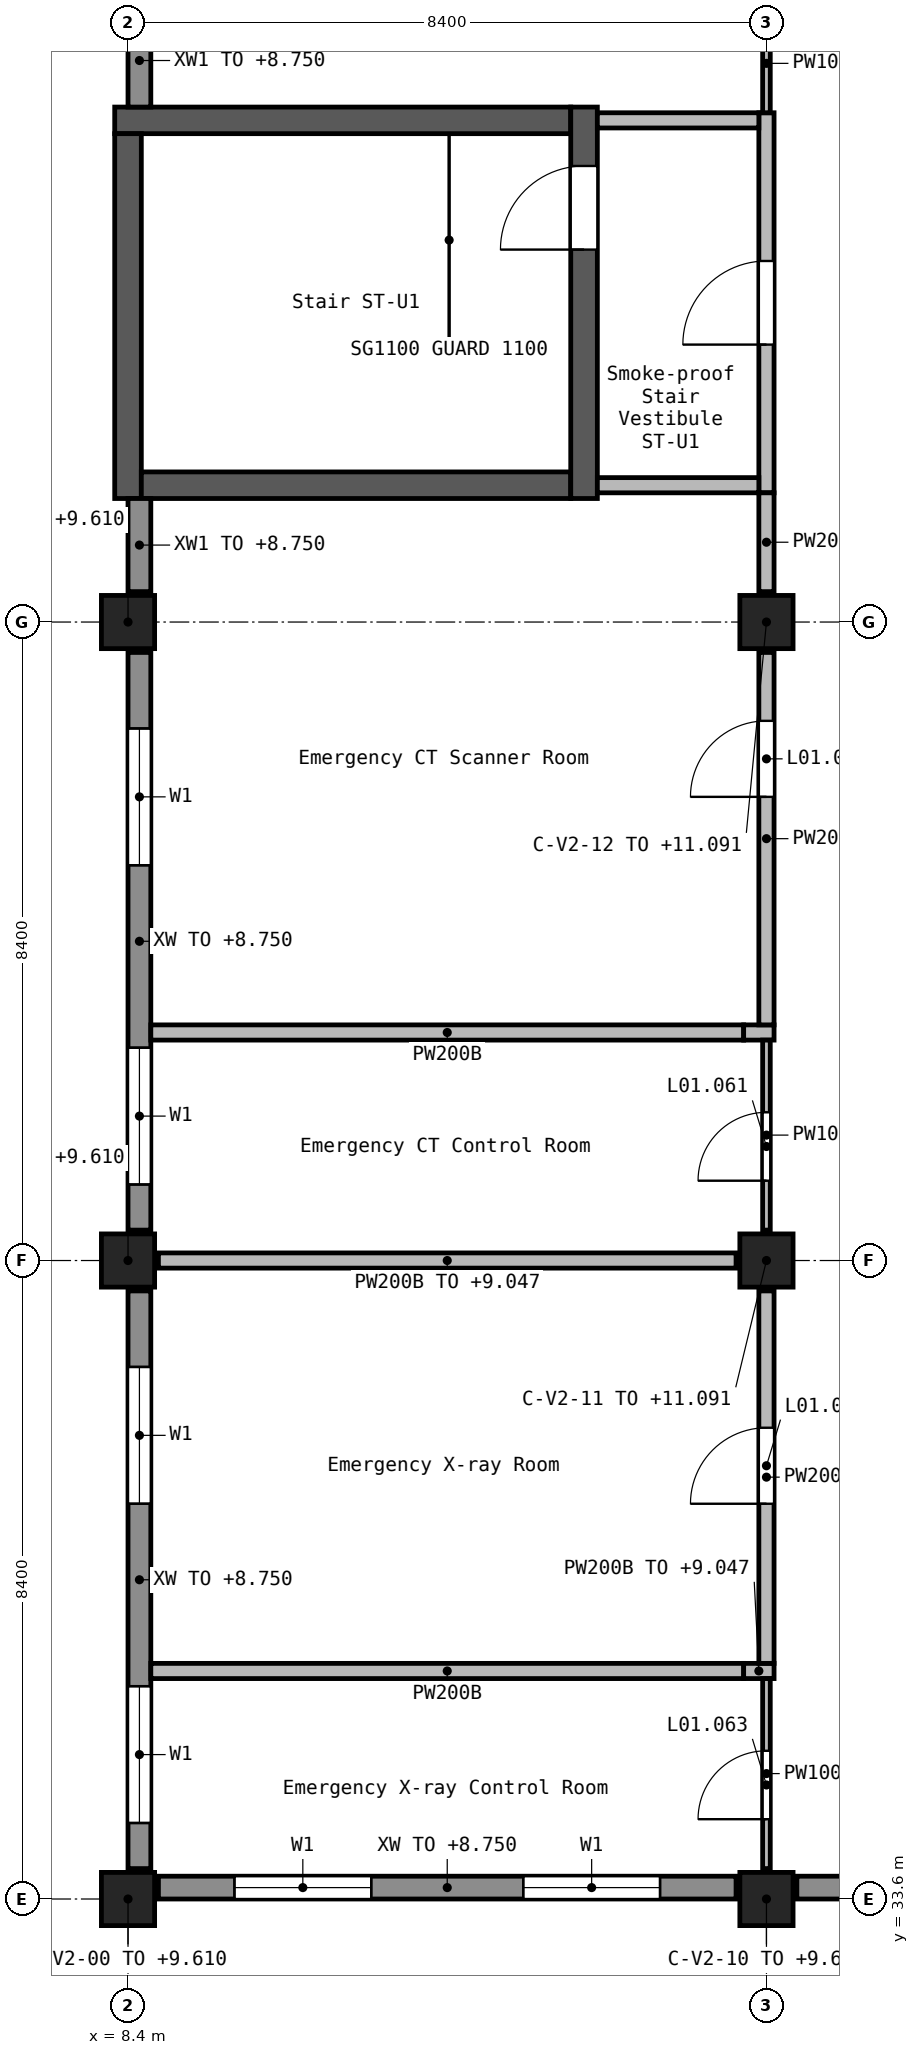
"""IFC4 building model, lengths in metres.
Left out: names, types, materials, properties, quantities, classifications, styles, units other than length and angle.
Written with IfcOpenShell. Run it as: python <this file> out.ifc"""

import sys

from ifc_helpers import new_model, si_unit, direction, frame, frame_2d, origin, origin_2d, place, context, subcontext, project, spatial, rectangle, extrude, element, fill, save


model = new_model("IFC4")
c1 = context("Model", 3, precision=1e-05, world=origin(), true_north=direction((0.0, 1.0)))
c2 = subcontext(c1, "Body", "Model", "MODEL_VIEW")
j1 = project(units=[si_unit("LENGTHUNIT", "METRE"), si_unit("PLANEANGLEUNIT", "RADIAN")], contexts=[c1])
p1 = place(None, origin())
s1 = spatial("IfcSite", under=j1, at=p1, CompositionType="ELEMENT")
p2 = place(p1, origin())
s2 = spatial("IfcBuilding", under=s1, at=p2, CompositionType="ELEMENT")
p3 = place(p2, frame((0.0, 0.0, 5.4)))
s3 = spatial("IfcBuildingStorey", under=s2, at=p3, CompositionType="ELEMENT", Elevation=5.4)
for number, where, z_axis, x_axis in (
    (1, (8.4, 33.6, 0.0), (0.0, 0.0, 1.0), (1.0, 0.0, 0.0)),
    (2, (8.4, 42.0, 0.0), (0.0, 0.0, 1.0), (1.0, 0.0, 0.0)),
    (3, (8.4, 50.4, 0.0), (0.0, 0.0, 1.0), (1.0, 0.0, 0.0)),
    (4, (16.8, 33.6, 0.0), (0.0, 0.0, 1.0), (1.0, 0.0, 0.0)),
):
    element("IfcColumn", number, at=place(p3, frame(where, z_axis=z_axis, x_axis=x_axis)), inside=s3, PredefinedType="COLUMN", context=c2, shape_type="SweptSolid", body=[
        extrude(rectangle(XDim=0.7, YDim=0.7, at=origin_2d()), origin(), (0.0, 0.0, 1.0), 4.21),
    ])
for number, where, z_axis, x_axis in (
    (5, (16.8, 42.0, 0.0), (0.0, 0.0, 1.0), (1.0, 0.0, 0.0)),
    (6, (16.8, 50.4, 0.0), (0.0, 0.0, 1.0), (1.0, 0.0, 0.0)),
):
    element("IfcColumn", number, at=place(p3, frame(where, z_axis=z_axis, x_axis=x_axis)), inside=s3, PredefinedType="COLUMN", context=c2, shape_type="SweptSolid", body=[
        extrude(rectangle(XDim=0.7, YDim=0.7, at=origin_2d()), origin(), (0.0, 0.0, 1.0), 5.691),
    ])
p4 = place(p3, frame((8.225, 57.0, 0.0), z_axis=(0.0, 0.0, 1.0), x_axis=(1.0, 0.0, 0.0)))
e7 = element("IfcWall", 7, at=p4, inside=s3, PredefinedType="SHEAR", context=c2, shape_type="SweptSolid", body=[
    extrude(rectangle(XDim=6.0, YDim=0.35, at=frame_2d((3.0, 0.0))), origin(), (0.0, 0.0, 1.0), 4.5),
])
p5 = place(p3, frame((8.4, 52.025, 0.0), z_axis=(0.0, 0.0, 1.0), x_axis=(0.0, 1.0, 0.0)))
e8 = element("IfcWall", 8, at=p5, inside=s3, PredefinedType="SHEAR", context=c2, shape_type="SweptSolid", body=[
    extrude(rectangle(XDim=4.8, YDim=0.35, at=frame_2d((2.4, 0.0))), origin(), (0.0, 0.0, 1.0), 4.5),
])
p6 = place(p3, frame((8.575, 52.2, 0.0), z_axis=(0.0, 0.0, 1.0), x_axis=(1.0, 0.0, 0.0)))
e9 = element("IfcWall", 9, at=p6, inside=s3, PredefinedType="SHEAR", context=c2, shape_type="SweptSolid", body=[
    extrude(rectangle(XDim=5.65, YDim=0.35, at=frame_2d((2.825, 0.0))), origin(), (0.0, 0.0, 1.0), 4.5),
])
p7 = place(p3, frame((14.4, 52.025, 0.0), z_axis=(0.0, 0.0, 1.0), x_axis=(0.0, 1.0, 0.0)))
e10 = element("IfcWall", 10, at=p7, inside=s3, PredefinedType="SHEAR", context=c2, shape_type="SweptSolid", body=[
    extrude(rectangle(XDim=5.15, YDim=0.35, at=frame_2d((2.575, 0.0))), origin(), (0.0, 0.0, 1.0), 4.5),
])
p8 = place(p7, frame((3.275, 0.0, 0.0)))
e11 = element("IfcOpeningElement", 11, at=p8, cuts=e10, PredefinedType="OPENING", context=c2, shape_type="SweptSolid", body=[
    extrude(rectangle(XDim=1.1, YDim=2.1, at=frame_2d((0.55, 1.05))), frame((0.0, 0.185, 0.0), z_axis=(0.0, -1.0, 0.0), x_axis=(1.0, 0.0, 0.0)), (0.0, 0.0, 1.0), 0.37),
])
for number, where, z_axis, x_axis in (
    (12, (8.55, 58.4, 0.0), (0.0, 0.0, 1.0), (0.0, -1.0, 0.0)),
    (13, (8.55, 52.025, 0.0), (0.0, 0.0, 1.0), (0.0, -1.0, 0.0)),
):
    element("IfcWall", number, at=place(p3, frame(where, z_axis=z_axis, x_axis=x_axis)), inside=s3, PredefinedType="STANDARD", context=c2, shape_type="SweptSolid", body=[
        extrude(rectangle(XDim=1.225, YDim=0.3, at=frame_2d((0.612, 0.0))), origin(), (0.0, 0.0, 1.0), 3.35),
    ])
p9 = place(p3, frame((8.55, 50.0, 0.0), z_axis=(0.0, 0.0, 1.0), x_axis=(0.0, -1.0, 0.0)))
e14 = element("IfcWall", 14, at=p9, inside=s3, PredefinedType="STANDARD", context=c2, shape_type="SweptSolid", body=[
    extrude(rectangle(XDim=7.6, YDim=0.3, at=frame_2d((3.8, 0.0))), origin(), (0.0, 0.0, 1.0), 3.35),
])
p10 = place(p9, frame((1.0, 0.0, 0.9)))
e15 = element("IfcOpeningElement", 15, at=p10, cuts=e14, PredefinedType="OPENING", context=c2, shape_type="SweptSolid", body=[
    extrude(rectangle(XDim=1.8, YDim=1.5, at=frame_2d((0.9, 0.75))), frame((0.0, 0.16, 0.0), z_axis=(0.0, -1.0, 0.0), x_axis=(1.0, 0.0, 0.0)), (0.0, 0.0, 1.0), 0.32),
])
p11 = place(p9, frame((5.2, 0.0, 0.9)))
e16 = element("IfcOpeningElement", 16, at=p11, cuts=e14, PredefinedType="OPENING", context=c2, shape_type="SweptSolid", body=[
    extrude(rectangle(XDim=1.8, YDim=1.5, at=frame_2d((0.9, 0.75))), frame((0.0, 0.16, 0.0), z_axis=(0.0, -1.0, 0.0), x_axis=(1.0, 0.0, 0.0)), (0.0, 0.0, 1.0), 0.32),
])
p12 = place(p3, frame((8.55, 41.6, 0.0), z_axis=(0.0, 0.0, 1.0), x_axis=(0.0, -1.0, 0.0)))
e17 = element("IfcWall", 17, at=p12, inside=s3, PredefinedType="STANDARD", context=c2, shape_type="SweptSolid", body=[
    extrude(rectangle(XDim=7.6, YDim=0.3, at=frame_2d((3.8, 0.0))), origin(), (0.0, 0.0, 1.0), 3.35),
])
p13 = place(p12, frame((1.0, 0.0, 0.9)))
e18 = element("IfcOpeningElement", 18, at=p13, cuts=e17, PredefinedType="OPENING", context=c2, shape_type="SweptSolid", body=[
    extrude(rectangle(XDim=1.8, YDim=1.5, at=frame_2d((0.9, 0.75))), frame((0.0, 0.16, 0.0), z_axis=(0.0, -1.0, 0.0), x_axis=(1.0, 0.0, 0.0)), (0.0, 0.0, 1.0), 0.32),
])
p14 = place(p12, frame((5.2, 0.0, 0.9)))
e19 = element("IfcOpeningElement", 19, at=p14, cuts=e17, PredefinedType="OPENING", context=c2, shape_type="SweptSolid", body=[
    extrude(rectangle(XDim=1.8, YDim=1.5, at=frame_2d((0.9, 0.75))), frame((0.0, 0.16, 0.0), z_axis=(0.0, -1.0, 0.0), x_axis=(1.0, 0.0, 0.0)), (0.0, 0.0, 1.0), 0.32),
])
p15 = place(p3, frame((8.8, 33.75, 0.0), z_axis=(0.0, 0.0, 1.0), x_axis=(1.0, 0.0, 0.0)))
e20 = element("IfcWall", 20, at=p15, inside=s3, PredefinedType="STANDARD", context=c2, shape_type="SweptSolid", body=[
    extrude(rectangle(XDim=7.6, YDim=0.3, at=frame_2d((3.8, 0.0))), origin(), (0.0, 0.0, 1.0), 3.35),
])
p16 = place(p15, frame((1.0, 0.0, 0.9)))
e21 = element("IfcOpeningElement", 21, at=p16, cuts=e20, PredefinedType="OPENING", context=c2, shape_type="SweptSolid", body=[
    extrude(rectangle(XDim=1.8, YDim=1.5, at=frame_2d((0.9, 0.75))), frame((0.0, 0.16, 0.0), z_axis=(0.0, -1.0, 0.0), x_axis=(1.0, 0.0, 0.0)), (0.0, 0.0, 1.0), 0.32),
])
p17 = place(p15, frame((4.8, 0.0, 0.9)))
e22 = element("IfcOpeningElement", 22, at=p17, cuts=e20, PredefinedType="OPENING", context=c2, shape_type="SweptSolid", body=[
    extrude(rectangle(XDim=1.8, YDim=1.5, at=frame_2d((0.9, 0.75))), frame((0.0, 0.16, 0.0), z_axis=(0.0, -1.0, 0.0), x_axis=(1.0, 0.0, 0.0)), (0.0, 0.0, 1.0), 0.32),
])
p18 = place(p3, frame((17.2, 33.75, 0.0), z_axis=(0.0, 0.0, 1.0), x_axis=(1.0, 0.0, 0.0)))
e23 = element("IfcWall", 23, at=p18, inside=s3, PredefinedType="STANDARD", context=c2, shape_type="SweptSolid", body=[
    extrude(rectangle(XDim=7.6, YDim=0.3, at=frame_2d((3.8, 0.0))), origin(), (0.0, 0.0, 1.0), 3.35),
])
p19 = place(p18, frame((0.65, 0.0, 0.9)))
e24 = element("IfcOpeningElement", 24, at=p19, cuts=e23, PredefinedType="OPENING", context=c2, shape_type="SweptSolid", body=[
    extrude(rectangle(XDim=1.8, YDim=1.5, at=frame_2d((0.9, 0.75))), frame((0.0, 0.16, 0.0), z_axis=(0.0, -1.0, 0.0), x_axis=(1.0, 0.0, 0.0)), (0.0, 0.0, 1.0), 0.32),
])
p20 = place(p18, frame((4.8, 0.0, 0.9)))
e25 = element("IfcOpeningElement", 25, at=p20, cuts=e23, PredefinedType="OPENING", context=c2, shape_type="SweptSolid", body=[
    extrude(rectangle(XDim=1.8, YDim=1.5, at=frame_2d((0.9, 0.75))), frame((0.0, 0.16, 0.0), z_axis=(0.0, -1.0, 0.0), x_axis=(1.0, 0.0, 0.0)), (0.0, 0.0, 1.0), 0.32),
])
p21 = place(p3, frame((16.8, 52.1, 0.0), z_axis=(0.0, 0.0, 1.0), x_axis=(0.0, 1.0, 0.0)))
e26 = element("IfcWall", 26, at=p21, inside=s3, PredefinedType="SOLIDWALL", context=c2, shape_type="SweptSolid", body=[
    extrude(rectangle(XDim=5.0, YDim=0.2, at=frame_2d((2.5, 0.0))), origin(), (0.0, 0.0, 1.0), 4.15),
])
p22 = place(p21, frame((1.95, 0.0, 0.0)))
e27 = element("IfcOpeningElement", 27, at=p22, cuts=e26, PredefinedType="OPENING", context=c2, shape_type="SweptSolid", body=[
    extrude(rectangle(XDim=1.1, YDim=2.1, at=frame_2d((0.55, 1.05))), frame((0.0, 0.11, 0.0), z_axis=(0.0, -1.0, 0.0), x_axis=(1.0, 0.0, 0.0)), (0.0, 0.0, 1.0), 0.22),
])
for number, where, z_axis, x_axis in (
    (28, (14.575, 52.2, 0.0), (0.0, 0.0, 1.0), (1.0, 0.0, 0.0)),
    (29, (14.575, 57.0, 0.0), (0.0, 0.0, 1.0), (1.0, 0.0, 0.0)),
):
    element("IfcWall", number, at=place(p3, frame(where, z_axis=z_axis, x_axis=x_axis)), inside=s3, PredefinedType="SOLIDWALL", context=c2, shape_type="SweptSolid", body=[
        extrude(rectangle(XDim=2.125, YDim=0.2, at=frame_2d((1.062, 0.0))), origin(), (0.0, 0.0, 1.0), 4.15),
    ])
p23 = place(p3, frame((8.7, 36.6, 0.0), z_axis=(0.0, 0.0, 1.0), x_axis=(1.0, 0.0, 0.0)))
e30 = element("IfcWall", 30, at=p23, inside=s3, PredefinedType="SOLIDWALL", context=c2, shape_type="SweptSolid", body=[
    extrude(rectangle(XDim=7.8, YDim=0.2, at=frame_2d((3.9, 0.0))), origin(), (0.0, 0.0, 1.0), 4.15),
])
p24 = place(p3, frame((16.5, 36.6, 0.0), z_axis=(0.0, 0.0, 1.0), x_axis=(1.0, 0.0, 0.0)))
e31 = element("IfcWall", 31, at=p24, inside=s3, PredefinedType="SOLIDWALL", context=c2, shape_type="SweptSolid", body=[
    extrude(rectangle(XDim=0.4, YDim=0.2, at=frame_2d((0.2, 0.0))), origin(), (0.0, 0.0, 1.0), 3.647),
])
p25 = place(p3, frame((8.8, 42.0, 0.0), z_axis=(0.0, 0.0, 1.0), x_axis=(1.0, 0.0, 0.0)))
e32 = element("IfcWall", 32, at=p25, inside=s3, PredefinedType="SOLIDWALL", context=c2, shape_type="SweptSolid", body=[
    extrude(rectangle(XDim=7.6, YDim=0.2, at=frame_2d((3.8, 0.0))), origin(), (0.0, 0.0, 1.0), 3.647),
])
p26 = place(p3, frame((8.7, 45.0, 0.0), z_axis=(0.0, 0.0, 1.0), x_axis=(1.0, 0.0, 0.0)))
e33 = element("IfcWall", 33, at=p26, inside=s3, PredefinedType="SOLIDWALL", context=c2, shape_type="SweptSolid", body=[
    extrude(rectangle(XDim=7.8, YDim=0.2, at=frame_2d((3.9, 0.0))), origin(), (0.0, 0.0, 1.0), 4.15),
])
p27 = place(p3, frame((16.5, 45.0, 0.0), z_axis=(0.0, 0.0, 1.0), x_axis=(1.0, 0.0, 0.0)))
e34 = element("IfcWall", 34, at=p27, inside=s3, PredefinedType="SOLIDWALL", context=c2, shape_type="SweptSolid", body=[
    extrude(rectangle(XDim=0.4, YDim=0.2, at=frame_2d((0.2, 0.0))), origin(), (0.0, 0.0, 1.0), 4.15),
])
p28 = place(p3, frame((16.8, 45.1, 0.0), z_axis=(0.0, 0.0, 1.0), x_axis=(0.0, 1.0, 0.0)))
e35 = element("IfcWall", 35, at=p28, inside=s3, PredefinedType="SOLIDWALL", context=c2, shape_type="SweptSolid", body=[
    extrude(rectangle(XDim=4.9, YDim=0.2, at=frame_2d((2.45, 0.0))), origin(), (0.0, 0.0, 1.0), 4.15),
])
p29 = place(p28, frame((3.0, 0.0, 0.0)))
e36 = element("IfcOpeningElement", 36, at=p29, cuts=e35, PredefinedType="OPENING", context=c2, shape_type="SweptSolid", body=[
    extrude(rectangle(XDim=1.0, YDim=2.1, at=frame_2d((0.5, 1.05))), frame((0.0, 0.11, 0.0), z_axis=(0.0, -1.0, 0.0), x_axis=(1.0, 0.0, 0.0)), (0.0, 0.0, 1.0), 0.22),
])
p30 = place(p3, frame((16.8, 50.8, 0.0), z_axis=(0.0, 0.0, 1.0), x_axis=(0.0, 1.0, 0.0)))
e37 = element("IfcWall", 37, at=p30, inside=s3, PredefinedType="SOLIDWALL", context=c2, shape_type="SweptSolid", body=[
    extrude(rectangle(XDim=1.3, YDim=0.2, at=frame_2d((0.65, 0.0))), origin(), (0.0, 0.0, 1.0), 4.15),
])
p31 = place(p3, frame((16.8, 36.7, 0.0), z_axis=(0.0, 0.0, 1.0), x_axis=(0.0, 1.0, 0.0)))
e38 = element("IfcWall", 38, at=p31, inside=s3, PredefinedType="SOLIDWALL", context=c2, shape_type="SweptSolid", body=[
    extrude(rectangle(XDim=4.9, YDim=0.2, at=frame_2d((2.45, 0.0))), origin(), (0.0, 0.0, 1.0), 3.647),
])
p32 = place(p31, frame((2.1, 0.0, 0.0)))
e39 = element("IfcOpeningElement", 39, at=p32, cuts=e38, PredefinedType="OPENING", context=c2, shape_type="SweptSolid", body=[
    extrude(rectangle(XDim=1.0, YDim=2.1, at=frame_2d((0.5, 1.05))), frame((0.0, 0.11, 0.0), z_axis=(0.0, -1.0, 0.0), x_axis=(1.0, 0.0, 0.0)), (0.0, 0.0, 1.0), 0.22),
])
p33 = place(p3, frame((16.8, 58.4, 0.0), z_axis=(0.0, 0.0, 1.0), x_axis=(0.0, -1.0, 0.0)))
e40 = element("IfcWall", 40, at=p33, inside=s3, PredefinedType="PARTITIONING", context=c2, shape_type="SweptSolid", body=[
    extrude(rectangle(XDim=1.3, YDim=0.1, at=frame_2d((0.65, 0.0))), origin(), (0.0, 0.0, 1.0), 4.15),
])
p34 = place(p3, frame((16.8, 34.0, 0.0), z_axis=(0.0, 0.0, 1.0), x_axis=(0.0, 1.0, 0.0)))
e41 = element("IfcWall", 41, at=p34, inside=s3, PredefinedType="PARTITIONING", context=c2, shape_type="SweptSolid", body=[
    extrude(rectangle(XDim=2.5, YDim=0.1, at=frame_2d((1.25, 0.0))), origin(), (0.0, 0.0, 1.0), 3.647),
])
p35 = place(p34, frame((0.65, 0.0, 0.0)))
e42 = element("IfcOpeningElement", 42, at=p35, cuts=e41, PredefinedType="OPENING", context=c2, shape_type="SweptSolid", body=[
    extrude(rectangle(XDim=0.9, YDim=2.1, at=frame_2d((0.45, 1.05))), frame((0.0, 0.06, 0.0), z_axis=(0.0, -1.0, 0.0), x_axis=(1.0, 0.0, 0.0)), (0.0, 0.0, 1.0), 0.12),
])
p36 = place(p3, frame((16.8, 42.4, 0.0), z_axis=(0.0, 0.0, 1.0), x_axis=(0.0, 1.0, 0.0)))
e43 = element("IfcWall", 43, at=p36, inside=s3, PredefinedType="PARTITIONING", context=c2, shape_type="SweptSolid", body=[
    extrude(rectangle(XDim=2.5, YDim=0.1, at=frame_2d((1.25, 0.0))), origin(), (0.0, 0.0, 1.0), 4.15),
])
p37 = place(p36, frame((0.65, 0.0, 0.0)))
e44 = element("IfcOpeningElement", 44, at=p37, cuts=e43, PredefinedType="OPENING", context=c2, shape_type="SweptSolid", body=[
    extrude(rectangle(XDim=0.9, YDim=2.1, at=frame_2d((0.45, 1.05))), frame((0.0, 0.06, 0.0), z_axis=(0.0, -1.0, 0.0), x_axis=(1.0, 0.0, 0.0)), (0.0, 0.0, 1.0), 0.12),
])
p38 = place(p10, origin())
e45 = element("IfcWindow", 45, at=p38, inside=s3, PartitioningType="SINGLE_PANEL", PredefinedType="WINDOW", context=c2, shape_type="SweptSolid", body=[
    extrude(rectangle(XDim=1.8, YDim=1.5, at=frame_2d((0.9, 0.75))), frame((0.0, 0.03, 0.0), z_axis=(0.0, -1.0, 0.0), x_axis=(1.0, 0.0, 0.0)), (0.0, 0.0, 1.0), 0.06),
])
fill(e15, e45)
p39 = place(p11, origin())
e46 = element("IfcWindow", 46, at=p39, inside=s3, PartitioningType="SINGLE_PANEL", PredefinedType="WINDOW", context=c2, shape_type="SweptSolid", body=[
    extrude(rectangle(XDim=1.8, YDim=1.5, at=frame_2d((0.9, 0.75))), frame((0.0, 0.03, 0.0), z_axis=(0.0, -1.0, 0.0), x_axis=(1.0, 0.0, 0.0)), (0.0, 0.0, 1.0), 0.06),
])
fill(e16, e46)
p40 = place(p13, origin())
e47 = element("IfcWindow", 47, at=p40, inside=s3, PartitioningType="SINGLE_PANEL", PredefinedType="WINDOW", context=c2, shape_type="SweptSolid", body=[
    extrude(rectangle(XDim=1.8, YDim=1.5, at=frame_2d((0.9, 0.75))), frame((0.0, 0.03, 0.0), z_axis=(0.0, -1.0, 0.0), x_axis=(1.0, 0.0, 0.0)), (0.0, 0.0, 1.0), 0.06),
])
fill(e18, e47)
p41 = place(p14, origin())
e48 = element("IfcWindow", 48, at=p41, inside=s3, PartitioningType="SINGLE_PANEL", PredefinedType="WINDOW", context=c2, shape_type="SweptSolid", body=[
    extrude(rectangle(XDim=1.8, YDim=1.5, at=frame_2d((0.9, 0.75))), frame((0.0, 0.03, 0.0), z_axis=(0.0, -1.0, 0.0), x_axis=(1.0, 0.0, 0.0)), (0.0, 0.0, 1.0), 0.06),
])
fill(e19, e48)
p42 = place(p16, origin())
e49 = element("IfcWindow", 49, at=p42, inside=s3, PartitioningType="SINGLE_PANEL", PredefinedType="WINDOW", context=c2, shape_type="SweptSolid", body=[
    extrude(rectangle(XDim=1.8, YDim=1.5, at=frame_2d((0.9, 0.75))), frame((0.0, 0.03, 0.0), z_axis=(0.0, -1.0, 0.0), x_axis=(1.0, 0.0, 0.0)), (0.0, 0.0, 1.0), 0.06),
])
fill(e21, e49)
p43 = place(p17, origin())
e50 = element("IfcWindow", 50, at=p43, inside=s3, PartitioningType="SINGLE_PANEL", PredefinedType="WINDOW", context=c2, shape_type="SweptSolid", body=[
    extrude(rectangle(XDim=1.8, YDim=1.5, at=frame_2d((0.9, 0.75))), frame((0.0, 0.03, 0.0), z_axis=(0.0, -1.0, 0.0), x_axis=(1.0, 0.0, 0.0)), (0.0, 0.0, 1.0), 0.06),
])
fill(e22, e50)
p44 = place(p8, origin())
e51 = element("IfcDoor", 51, at=p44, inside=s3, OperationType="SINGLE_SWING_RIGHT", PredefinedType="DOOR", context=c2, shape_type="SweptSolid", body=[
    extrude(rectangle(XDim=1.1, YDim=2.1, at=frame_2d((0.55, 1.05))), frame((0.0, 0.025, 0.0), z_axis=(0.0, -1.0, 0.0), x_axis=(1.0, 0.0, 0.0)), (0.0, 0.0, 1.0), 0.05),
])
fill(e11, e51)
p45 = place(p22, origin())
e52 = element("IfcDoor", 52, at=p45, inside=s3, OperationType="SINGLE_SWING_LEFT", PredefinedType="DOOR", context=c2, shape_type="SweptSolid", body=[
    extrude(rectangle(XDim=1.1, YDim=2.1, at=frame_2d((0.55, 1.05))), frame((0.0, 0.025, 0.0), z_axis=(0.0, -1.0, 0.0), x_axis=(1.0, 0.0, 0.0)), (0.0, 0.0, 1.0), 0.05),
])
fill(e27, e52)
p46 = place(p29, origin())
e53 = element("IfcDoor", 53, at=p46, inside=s3, OperationType="SINGLE_SWING_RIGHT", PredefinedType="DOOR", context=c2, shape_type="SweptSolid", body=[
    extrude(rectangle(XDim=1.0, YDim=2.1, at=frame_2d((0.5, 1.05))), frame((0.0, 0.025, 0.0), z_axis=(0.0, -1.0, 0.0), x_axis=(1.0, 0.0, 0.0)), (0.0, 0.0, 1.0), 0.05),
])
fill(e36, e53)
p47 = place(p37, origin())
e54 = element("IfcDoor", 54, at=p47, inside=s3, OperationType="SINGLE_SWING_LEFT", PredefinedType="DOOR", context=c2, shape_type="SweptSolid", body=[
    extrude(rectangle(XDim=0.9, YDim=2.1, at=frame_2d((0.45, 1.05))), frame((0.0, 0.025, 0.0), z_axis=(0.0, -1.0, 0.0), x_axis=(1.0, 0.0, 0.0)), (0.0, 0.0, 1.0), 0.05),
])
fill(e44, e54)
p48 = place(p32, origin())
e55 = element("IfcDoor", 55, at=p48, inside=s3, OperationType="SINGLE_SWING_RIGHT", PredefinedType="DOOR", context=c2, shape_type="SweptSolid", body=[
    extrude(rectangle(XDim=1.0, YDim=2.1, at=frame_2d((0.5, 1.05))), frame((0.0, 0.025, 0.0), z_axis=(0.0, -1.0, 0.0), x_axis=(1.0, 0.0, 0.0)), (0.0, 0.0, 1.0), 0.05),
])
fill(e39, e55)
p49 = place(p35, origin())
e56 = element("IfcDoor", 56, at=p49, inside=s3, OperationType="SINGLE_SWING_LEFT", PredefinedType="DOOR", context=c2, shape_type="SweptSolid", body=[
    extrude(rectangle(XDim=0.9, YDim=2.1, at=frame_2d((0.45, 1.05))), frame((0.0, 0.025, 0.0), z_axis=(0.0, -1.0, 0.0), x_axis=(1.0, 0.0, 0.0)), (0.0, 0.0, 1.0), 0.05),
])
fill(e42, e56)
save(model, sys.argv[1])
